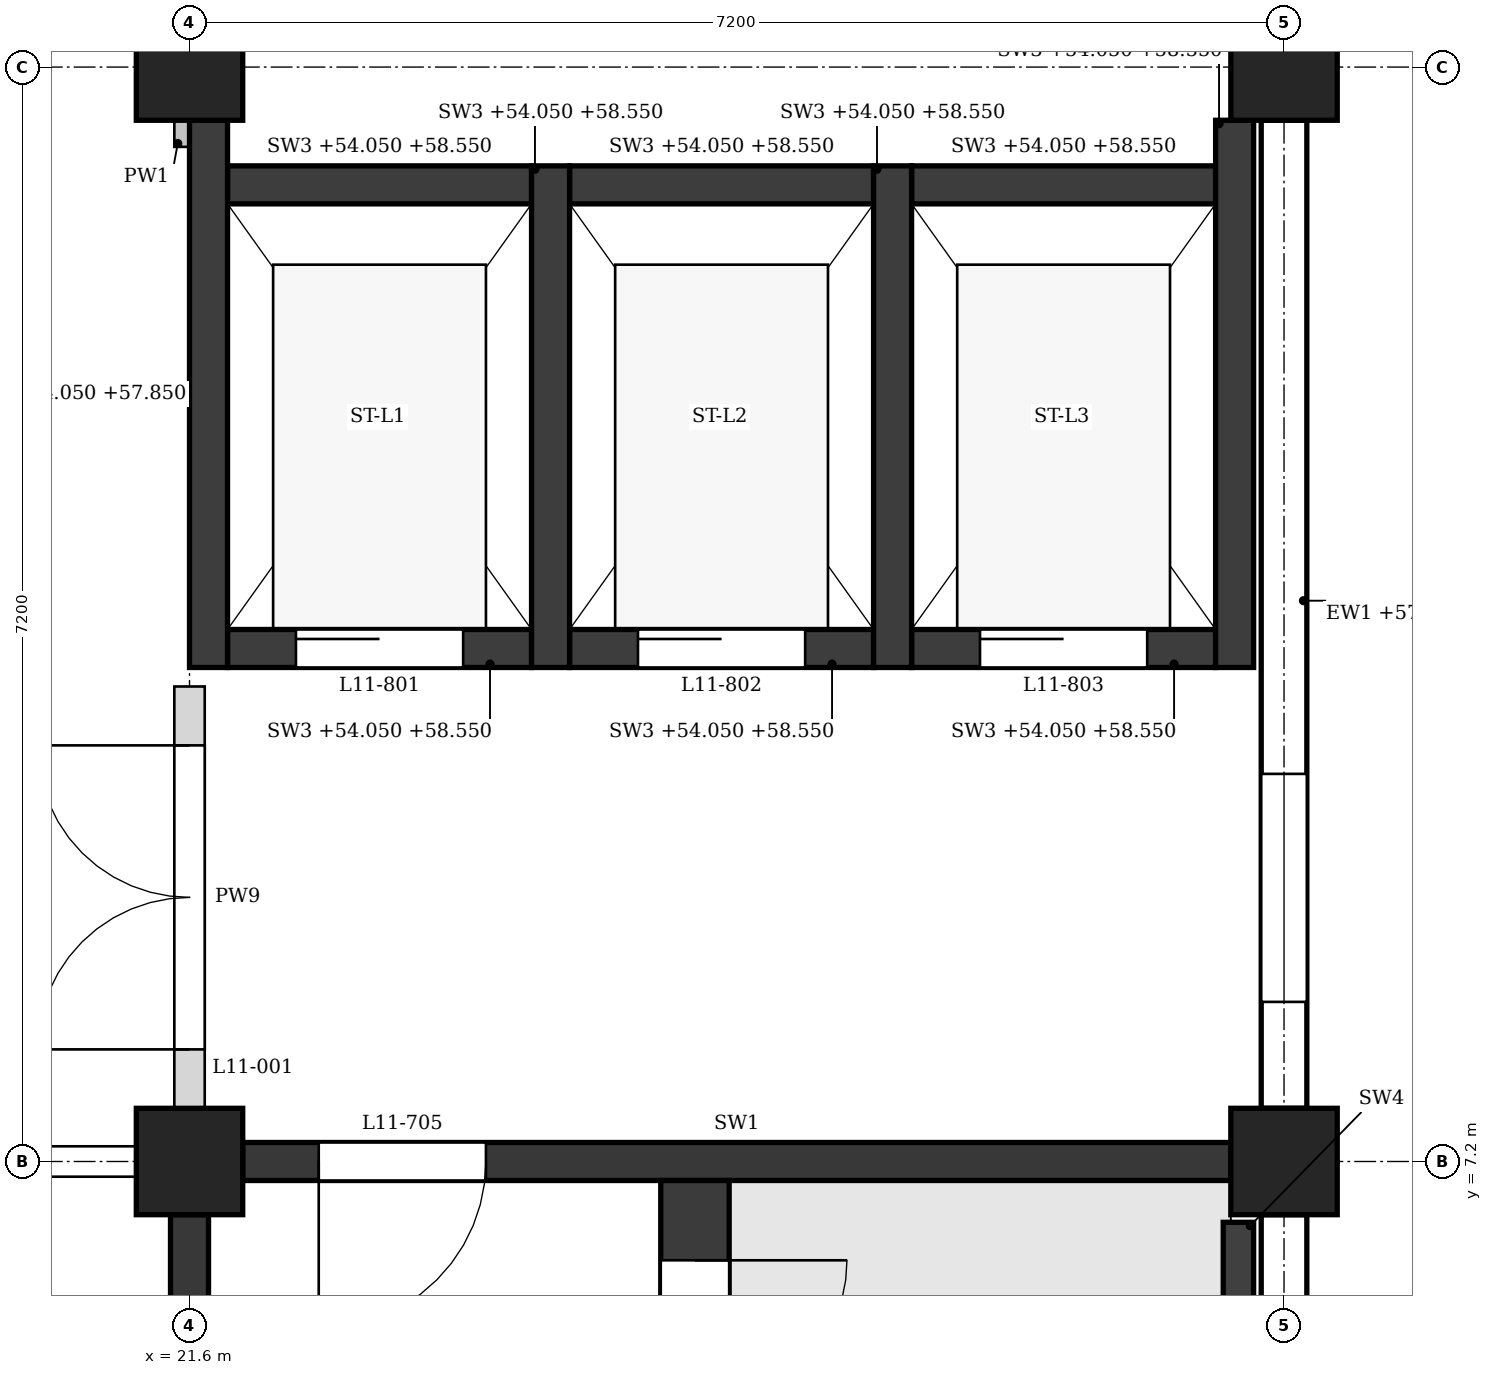
"""IFC4 building model, lengths in metres.
Left out: names, types, materials, properties, quantities, classifications, styles, units other than length and angle.
Written with IfcOpenShell. Run it as: python <this file> out.ifc"""

import sys

from ifc_helpers import new_model, si_unit, direction, frame, frame_2d, origin, origin_2d, place, context, subcontext, project, spatial, polyline, rectangle, outline, extrude, element, fill, save


model = new_model("IFC4")
c1 = context("Model", 3, precision=1e-05, world=origin(), true_north=direction((0.0, 1.0)))
c2 = subcontext(c1, "Body", "Model", "MODEL_VIEW")
j1 = project(units=[si_unit("LENGTHUNIT", "METRE"), si_unit("PLANEANGLEUNIT", "RADIAN")], contexts=[c1])
p1 = place(None, origin())
s1 = spatial("IfcSite", under=j1, at=p1, CompositionType="ELEMENT")
p2 = place(p1, origin())
s2 = spatial("IfcBuilding", under=s1, at=p2, CompositionType="ELEMENT")
p3 = place(p2, frame((0.0, 0.0, 54.3)))
s3 = spatial("IfcBuildingStorey", under=s2, at=p3, CompositionType="ELEMENT", Elevation=54.3)
for number, where, z_axis, x_axis in (
    (1, (21.6, 7.2, 0.0), (0.0, 0.0, 1.0), (1.0, 0.0, 0.0)),
    (2, (21.6, 14.4, 0.0), (0.0, 0.0, 1.0), (1.0, 0.0, 0.0)),
    (3, (28.8, 7.2, 0.0), (0.0, 0.0, 1.0), (1.0, 0.0, 0.0)),
    (4, (28.8, 14.4, 0.0), (0.0, 0.0, 1.0), (1.0, 0.0, 0.0)),
):
    element("IfcColumn", number, at=place(p3, frame(where, z_axis=z_axis, x_axis=x_axis)), inside=s3, PredefinedType="COLUMN", context=c2, shape_type="SweptSolid", body=[
        extrude(rectangle(XDim=0.7, YDim=0.7, at=origin_2d()), origin(), (0.0, 0.0, 1.0), 4.5),
    ])
p4 = place(p3, frame((28.8, 0.35, 0.0), z_axis=(0.0, 0.0, 1.0), x_axis=(0.0, 1.0, 0.0)))
e5 = element("IfcWall", 5, at=p4, inside=s3, PredefinedType="STANDARD", context=c2, shape_type="SweptSolid", body=[
    extrude(rectangle(XDim=6.5, YDim=0.3, at=frame_2d((3.25, 0.0))), origin(), (0.0, 0.0, 1.0), 3.65),
])
p5 = place(p4, frame((1.0, 0.0, 0.9)))
e6 = element("IfcOpeningElement", 6, at=p5, cuts=e5, PredefinedType="OPENING", context=c2, shape_type="SweptSolid", body=[
    extrude(outline(polyline([(0.0, 0.0), (0.9, 0.0), (0.9, 2.25), (0.45, 2.7), (0.0, 2.25), (0.0, 0.0)])), frame((0.0, 0.16, 0.0), z_axis=(0.0, -1.0, 0.0), x_axis=(1.0, 0.0, 0.0)), (0.0, 0.0, 1.0), 0.32),
])
p6 = place(p4, frame((4.6, 0.0, 0.9)))
e7 = element("IfcOpeningElement", 7, at=p6, cuts=e5, PredefinedType="OPENING", context=c2, shape_type="SweptSolid", body=[
    extrude(outline(polyline([(0.0, 0.0), (0.9, 0.0), (0.9, 2.25), (0.45, 2.7), (0.0, 2.25), (0.0, 0.0)])), frame((0.0, 0.16, 0.0), z_axis=(0.0, -1.0, 0.0), x_axis=(1.0, 0.0, 0.0)), (0.0, 0.0, 1.0), 0.32),
])
p7 = place(p3, frame((28.8, 7.55, 0.0), z_axis=(0.0, 0.0, 1.0), x_axis=(0.0, 1.0, 0.0)))
e8 = element("IfcWall", 8, at=p7, inside=s3, PredefinedType="STANDARD", context=c2, shape_type="SweptSolid", body=[
    extrude(rectangle(XDim=6.5, YDim=0.3, at=frame_2d((3.25, 0.0))), origin(), (0.0, 0.0, 1.0), 3.65),
])
p8 = place(p7, frame((0.7, 0.0, 0.9)))
e9 = element("IfcOpeningElement", 9, at=p8, cuts=e8, PredefinedType="OPENING", context=c2, shape_type="SweptSolid", body=[
    extrude(outline(polyline([(0.0, 0.0), (1.5, 0.0), (1.5, 1.95), (0.75, 2.7), (0.0, 1.95), (0.0, 0.0)])), frame((0.0, 0.16, 0.0), z_axis=(0.0, -1.0, 0.0), x_axis=(1.0, 0.0, 0.0)), (0.0, 0.0, 1.0), 0.32),
])
p9 = place(p3, frame((21.95, 7.2, 0.0), z_axis=(0.0, 0.0, 1.0), x_axis=(1.0, 0.0, 0.0)))
e10 = element("IfcWall", 10, at=p9, inside=s3, PredefinedType="SHEAR", context=c2, shape_type="SweptSolid", body=[
    extrude(rectangle(XDim=6.5, YDim=0.25, at=frame_2d((3.25, 0.0))), origin(), (0.0, 0.0, 1.0), 3.55),
])
p10 = place(p9, frame((0.5, 0.0, 0.0)))
e11 = element("IfcOpeningElement", 11, at=p10, cuts=e10, PredefinedType="OPENING", context=c2, shape_type="SweptSolid", body=[
    extrude(rectangle(XDim=1.1, YDim=2.1, at=frame_2d((0.55, 1.05))), frame((0.0, 0.135, 0.0), z_axis=(0.0, -1.0, 0.0), x_axis=(1.0, 0.0, 0.0)), (0.0, 0.0, 1.0), 0.27),
])
p11 = place(p3, frame((21.6, 0.35, 0.0), z_axis=(0.0, 0.0, 1.0), x_axis=(0.0, 1.0, 0.0)))
e12 = element("IfcWall", 12, at=p11, inside=s3, PredefinedType="SHEAR", context=c2, shape_type="SweptSolid", body=[
    extrude(rectangle(XDim=6.5, YDim=0.25, at=frame_2d((3.25, 0.0))), origin(), (0.0, 0.0, 1.0), 3.55),
])
p12 = place(p3, frame((28.5, 5.85, -0.25), z_axis=(0.0, 0.0, 1.0), x_axis=(0.0, 1.0, 0.0)))
e13 = element("IfcWall", 13, at=p12, inside=s3, PredefinedType="SHEAR", context=c2, shape_type="SweptSolid", body=[
    extrude(rectangle(XDim=0.95, YDim=0.2, at=frame_2d((0.475, 0.0))), origin(), (0.0, 0.0, 1.0), 4.5),
])
p13 = place(p3, frame((24.925, 0.15, 0.0), z_axis=(0.0, 0.0, 1.0), x_axis=(0.0, 1.0, 0.0)))
e14 = element("IfcWall", 14, at=p13, inside=s3, PredefinedType="SHEAR", context=c2, shape_type="SweptSolid", body=[
    extrude(rectangle(XDim=6.925, YDim=0.45, at=frame_2d((3.462, 0.0))), origin(), (0.0, 0.0, 1.0), 4.25),
])
p14 = place(p13, frame((5.4, 0.0, 0.0)))
e15 = element("IfcOpeningElement", 15, at=p14, cuts=e14, PredefinedType="OPENING", context=c2, shape_type="SweptSolid", body=[
    extrude(rectangle(XDim=1.0, YDim=2.1, at=frame_2d((0.5, 1.05))), frame((0.0, 0.235, 0.0), z_axis=(0.0, -1.0, 0.0), x_axis=(1.0, 0.0, 0.0)), (0.0, 0.0, 1.0), 0.47),
])
p15 = place(p3, frame((21.725, 10.45, -0.25), z_axis=(0.0, 0.0, 1.0), x_axis=(0.0, 1.0, 0.0)))
e16 = element("IfcWall", 16, at=p15, inside=s3, PredefinedType="SHEAR", context=c2, shape_type="SweptSolid", body=[
    extrude(rectangle(XDim=3.6, YDim=0.25, at=frame_2d((1.8, 0.0))), origin(), (0.0, 0.0, 1.0), 3.8),
])
for number, where, z_axis, x_axis in (
    (17, (23.975, 10.45, -0.25), (0.0, 0.0, 1.0), (0.0, 1.0, 0.0)),
    (18, (26.225, 10.45, -0.25), (0.0, 0.0, 1.0), (0.0, 1.0, 0.0)),
):
    element("IfcWall", number, at=place(p3, frame(where, z_axis=z_axis, x_axis=x_axis)), inside=s3, PredefinedType="SHEAR", context=c2, shape_type="SweptSolid", body=[
        extrude(rectangle(XDim=3.3, YDim=0.25, at=frame_2d((1.65, 0.0))), origin(), (0.0, 0.0, 1.0), 4.5),
    ])
p16 = place(p3, frame((28.475, 10.45, -0.25), z_axis=(0.0, 0.0, 1.0), x_axis=(0.0, 1.0, 0.0)))
e19 = element("IfcWall", 19, at=p16, inside=s3, PredefinedType="SHEAR", context=c2, shape_type="SweptSolid", body=[
    extrude(rectangle(XDim=3.6, YDim=0.25, at=frame_2d((1.8, 0.0))), origin(), (0.0, 0.0, 1.0), 4.5),
])
p17 = place(p3, frame((21.85, 10.575, -0.25), z_axis=(0.0, 0.0, 1.0), x_axis=(1.0, 0.0, 0.0)))
e20 = element("IfcWall", 20, at=p17, inside=s3, PredefinedType="SHEAR", context=c2, shape_type="SweptSolid", body=[
    extrude(rectangle(XDim=2.0, YDim=0.25, at=frame_2d((1.0, 0.0))), origin(), (0.0, 0.0, 1.0), 4.5),
])
p18 = place(p17, frame((0.45, 0.0, 0.25)))
e21 = element("IfcOpeningElement", 21, at=p18, cuts=e20, PredefinedType="OPENING", context=c2, shape_type="SweptSolid", body=[
    extrude(rectangle(XDim=1.1, YDim=2.1, at=frame_2d((0.55, 1.05))), frame((0.0, 0.135, 0.0), z_axis=(0.0, -1.0, 0.0), x_axis=(1.0, 0.0, 0.0)), (0.0, 0.0, 1.0), 0.27),
])
p19 = place(p3, frame((21.85, 13.625, -0.25), z_axis=(0.0, 0.0, 1.0), x_axis=(1.0, 0.0, 0.0)))
e22 = element("IfcWall", 22, at=p19, inside=s3, PredefinedType="SHEAR", context=c2, shape_type="SweptSolid", body=[
    extrude(rectangle(XDim=2.0, YDim=0.25, at=frame_2d((1.0, 0.0))), origin(), (0.0, 0.0, 1.0), 4.5),
])
p20 = place(p3, frame((24.1, 10.575, -0.25), z_axis=(0.0, 0.0, 1.0), x_axis=(1.0, 0.0, 0.0)))
e23 = element("IfcWall", 23, at=p20, inside=s3, PredefinedType="SHEAR", context=c2, shape_type="SweptSolid", body=[
    extrude(rectangle(XDim=2.0, YDim=0.25, at=frame_2d((1.0, 0.0))), origin(), (0.0, 0.0, 1.0), 4.5),
])
p21 = place(p20, frame((0.45, 0.0, 0.25)))
e24 = element("IfcOpeningElement", 24, at=p21, cuts=e23, PredefinedType="OPENING", context=c2, shape_type="SweptSolid", body=[
    extrude(rectangle(XDim=1.1, YDim=2.1, at=frame_2d((0.55, 1.05))), frame((0.0, 0.135, 0.0), z_axis=(0.0, -1.0, 0.0), x_axis=(1.0, 0.0, 0.0)), (0.0, 0.0, 1.0), 0.27),
])
p22 = place(p3, frame((24.1, 13.625, -0.25), z_axis=(0.0, 0.0, 1.0), x_axis=(1.0, 0.0, 0.0)))
e25 = element("IfcWall", 25, at=p22, inside=s3, PredefinedType="SHEAR", context=c2, shape_type="SweptSolid", body=[
    extrude(rectangle(XDim=2.0, YDim=0.25, at=frame_2d((1.0, 0.0))), origin(), (0.0, 0.0, 1.0), 4.5),
])
p23 = place(p3, frame((26.35, 10.575, -0.25), z_axis=(0.0, 0.0, 1.0), x_axis=(1.0, 0.0, 0.0)))
e26 = element("IfcWall", 26, at=p23, inside=s3, PredefinedType="SHEAR", context=c2, shape_type="SweptSolid", body=[
    extrude(rectangle(XDim=2.0, YDim=0.25, at=frame_2d((1.0, 0.0))), origin(), (0.0, 0.0, 1.0), 4.5),
])
p24 = place(p23, frame((0.45, 0.0, 0.25)))
e27 = element("IfcOpeningElement", 27, at=p24, cuts=e26, PredefinedType="OPENING", context=c2, shape_type="SweptSolid", body=[
    extrude(rectangle(XDim=1.1, YDim=2.1, at=frame_2d((0.55, 1.05))), frame((0.0, 0.135, 0.0), z_axis=(0.0, -1.0, 0.0), x_axis=(1.0, 0.0, 0.0)), (0.0, 0.0, 1.0), 0.27),
])
p25 = place(p3, frame((26.35, 13.625, -0.25), z_axis=(0.0, 0.0, 1.0), x_axis=(1.0, 0.0, 0.0)))
e28 = element("IfcWall", 28, at=p25, inside=s3, PredefinedType="SHEAR", context=c2, shape_type="SweptSolid", body=[
    extrude(rectangle(XDim=2.0, YDim=0.25, at=frame_2d((1.0, 0.0))), origin(), (0.0, 0.0, 1.0), 4.5),
])
p26 = place(p3, frame((14.75, 7.2, 0.0), z_axis=(0.0, 0.0, 1.0), x_axis=(1.0, 0.0, 0.0)))
e29 = element("IfcWall", 29, at=p26, inside=s3, PredefinedType="PARTITIONING", context=c2, shape_type="SweptSolid", body=[
    extrude(rectangle(XDim=6.5, YDim=0.2, at=frame_2d((3.25, 0.0))), origin(), (0.0, 0.0, 1.0), 3.55),
])
p27 = place(p26, frame((4.375, 0.0, 0.0)))
e30 = element("IfcOpeningElement", 30, at=p27, cuts=e29, PredefinedType="OPENING", context=c2, shape_type="SweptSolid", body=[
    extrude(rectangle(XDim=1.0, YDim=2.1, at=frame_2d((0.5, 1.05))), frame((0.0, 0.11, 0.0), z_axis=(0.0, -1.0, 0.0), x_axis=(1.0, 0.0, 0.0)), (0.0, 0.0, 1.0), 0.22),
])
p28 = place(p3, frame((21.6, 7.55, 0.0), z_axis=(0.0, 0.0, 1.0), x_axis=(0.0, 1.0, 0.0)))
e31 = element("IfcWall", 31, at=p28, inside=s3, PredefinedType="PARTITIONING", context=c2, shape_type="SweptSolid", body=[
    extrude(rectangle(XDim=2.775, YDim=0.2, at=frame_2d((1.387, 0.0))), origin(), (0.0, 0.0, 1.0), 3.55),
])
p29 = place(p28, frame((0.387, 0.0, 0.0)))
e32 = element("IfcOpeningElement", 32, at=p29, cuts=e31, PredefinedType="OPENING", context=c2, shape_type="SweptSolid", body=[
    extrude(rectangle(XDim=2.0, YDim=2.4, at=frame_2d((1.0, 1.2))), frame((0.0, 0.11, 0.0), z_axis=(0.0, -1.0, 0.0), x_axis=(1.0, 0.0, 0.0)), (0.0, 0.0, 1.0), 0.22),
])
p30 = place(p3, frame((21.6, 13.875, 0.0), z_axis=(0.0, 0.0, 1.0), x_axis=(0.0, 1.0, 0.0)))
e33 = element("IfcWall", 33, at=p30, inside=s3, PredefinedType="PARTITIONING", context=c2, shape_type="SweptSolid", body=[
    extrude(rectangle(XDim=0.175, YDim=0.2, at=frame_2d((0.087, 0.0))), origin(), (0.0, 0.0, 1.0), 3.55),
])
p31 = place(p8, origin())
e34 = element("IfcWindow", 34, at=p31, inside=s3, PartitioningType="SINGLE_PANEL", PredefinedType="WINDOW", context=c2, shape_type="SweptSolid", body=[
    extrude(outline(polyline([(0.0, 0.0), (1.5, 0.0), (1.5, 1.95), (0.75, 2.7), (0.0, 1.95), (0.0, 0.0)])), frame((0.0, 0.03, 0.0), z_axis=(0.0, -1.0, 0.0), x_axis=(1.0, 0.0, 0.0)), (0.0, 0.0, 1.0), 0.06),
])
fill(e9, e34)
p32 = place(p14, frame((1.0, 0.0, 0.0), z_axis=(0.0, 0.0, 1.0), x_axis=(-1.0, 0.0, 0.0)))
e35 = element("IfcDoor", 35, at=p32, inside=s3, OperationType="SINGLE_SWING_LEFT", PredefinedType="DOOR", context=c2, shape_type="SweptSolid", body=[
    extrude(rectangle(XDim=1.0, YDim=2.1, at=frame_2d((0.5, 1.05))), frame((0.0, 0.025, 0.0), z_axis=(0.0, -1.0, 0.0), x_axis=(1.0, 0.0, 0.0)), (0.0, 0.0, 1.0), 0.05),
])
fill(e15, e35)
p33 = place(p10, frame((1.1, 0.0, 0.0), z_axis=(0.0, 0.0, 1.0), x_axis=(-1.0, 0.0, 0.0)))
e36 = element("IfcDoor", 36, at=p33, inside=s3, OperationType="SINGLE_SWING_RIGHT", PredefinedType="DOOR", context=c2, shape_type="SweptSolid", body=[
    extrude(rectangle(XDim=1.1, YDim=2.1, at=frame_2d((0.55, 1.05))), frame((0.0, 0.025, 0.0), z_axis=(0.0, -1.0, 0.0), x_axis=(1.0, 0.0, 0.0)), (0.0, 0.0, 1.0), 0.05),
])
fill(e11, e36)
p34 = place(p18, origin())
e37 = element("IfcDoor", 37, at=p34, inside=s3, OperationType="SLIDING_TO_LEFT", PredefinedType="DOOR", context=c2, shape_type="SweptSolid", body=[
    extrude(rectangle(XDim=1.1, YDim=2.1, at=frame_2d((0.55, 1.05))), frame((0.0, 0.025, 0.0), z_axis=(0.0, -1.0, 0.0), x_axis=(1.0, 0.0, 0.0)), (0.0, 0.0, 1.0), 0.05),
])
fill(e21, e37)
p35 = place(p21, origin())
e38 = element("IfcDoor", 38, at=p35, inside=s3, OperationType="SLIDING_TO_LEFT", PredefinedType="DOOR", context=c2, shape_type="SweptSolid", body=[
    extrude(rectangle(XDim=1.1, YDim=2.1, at=frame_2d((0.55, 1.05))), frame((0.0, 0.025, 0.0), z_axis=(0.0, -1.0, 0.0), x_axis=(1.0, 0.0, 0.0)), (0.0, 0.0, 1.0), 0.05),
])
fill(e24, e38)
p36 = place(p24, origin())
e39 = element("IfcDoor", 39, at=p36, inside=s3, OperationType="SLIDING_TO_LEFT", PredefinedType="DOOR", context=c2, shape_type="SweptSolid", body=[
    extrude(rectangle(XDim=1.1, YDim=2.1, at=frame_2d((0.55, 1.05))), frame((0.0, 0.025, 0.0), z_axis=(0.0, -1.0, 0.0), x_axis=(1.0, 0.0, 0.0)), (0.0, 0.0, 1.0), 0.05),
])
fill(e27, e39)
p37 = place(p29, origin())
e40 = element("IfcDoor", 40, at=p37, inside=s3, OperationType="DOUBLE_DOOR_SINGLE_SWING", PredefinedType="DOOR", context=c2, shape_type="SweptSolid", body=[
    extrude(rectangle(XDim=2.0, YDim=2.4, at=frame_2d((1.0, 1.2))), frame((0.0, 0.025, 0.0), z_axis=(0.0, -1.0, 0.0), x_axis=(1.0, 0.0, 0.0)), (0.0, 0.0, 1.0), 0.05),
])
fill(e32, e40)
save(model, sys.argv[1])
